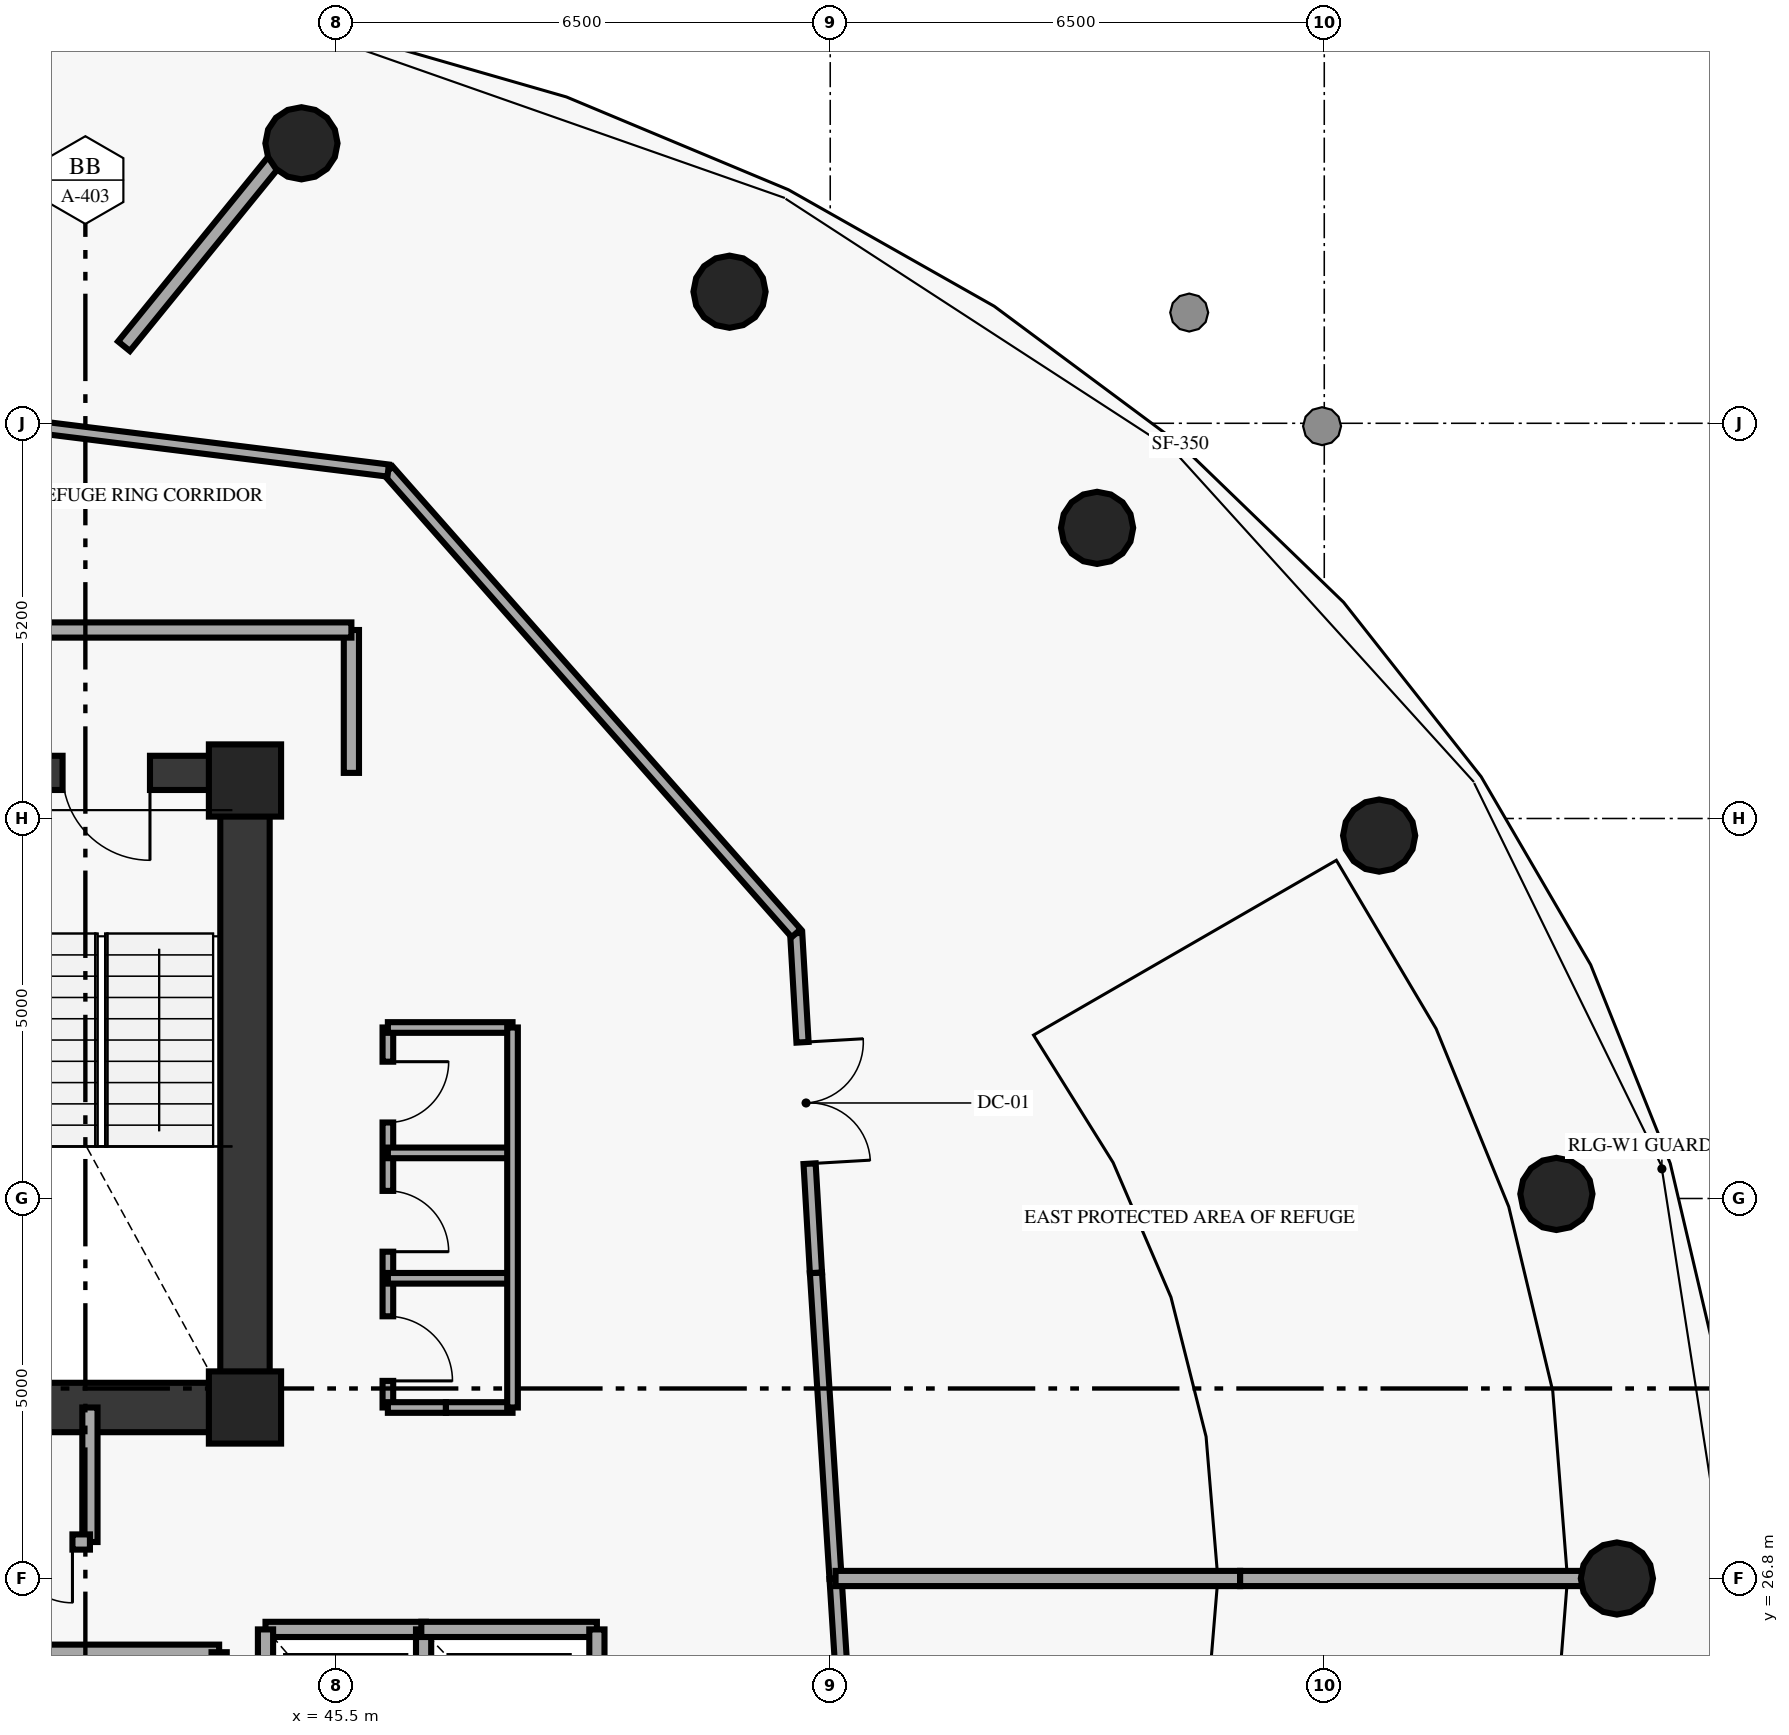
"""IFC4 building model, lengths in metres.
Left out: names, types, materials, properties, quantities, classifications, styles, units other than length and angle.
Written with IfcOpenShell. Run it as: python <this file> out.ifc"""

import sys

from ifc_helpers import new_model, si_unit, direction, frame, frame_2d, origin, origin_2d, place, context, subcontext, project, spatial, rectangle, circle, extrude, element, fill, save


model = new_model("IFC4")
c1 = context("Model", 3, precision=1e-05, world=origin(), true_north=direction((0.0, 1.0)))
c2 = subcontext(c1, "Body", "Model", "MODEL_VIEW")
j1 = project(units=[si_unit("LENGTHUNIT", "METRE"), si_unit("PLANEANGLEUNIT", "RADIAN")], contexts=[c1])
p1 = place(None, origin())
s1 = spatial("IfcSite", under=j1, at=p1, CompositionType="ELEMENT")
p2 = place(p1, origin())
s2 = spatial("IfcBuilding", under=s1, at=p2, CompositionType="ELEMENT")
p3 = place(p2, frame((0.0, 0.0, 195.95)))
s3 = spatial("IfcBuildingStorey", under=s2, at=p3, CompositionType="ELEMENT", Elevation=195.95)
for number, where, z_axis, x_axis in (
    (1, (44.3, 29.05, 0.0), (0.0, 0.0, 1.0), (1.0, 0.0, 0.0)),
    (2, (44.3, 37.3, 0.0), (0.0, 0.0, 1.0), (1.0, 0.0, 0.0)),
):
    element("IfcColumn", number, at=place(p3, frame(where, z_axis=z_axis, x_axis=x_axis)), inside=s3, PredefinedType="PILASTER", context=c2, shape_type="SweptSolid", body=[
        extrude(rectangle(XDim=0.95, YDim=0.95, at=origin_2d()), origin(), (0.0, 0.0, 1.0), 6.88),
    ])
for number, where, z_axis, x_axis in (
    (3, (62.35, 26.8, 0.0), (0.0, 0.0, 1.0), (1.0, 0.0, 0.0)),
    (4, (61.554, 31.86, 0.0), (0.0, 0.0, 1.0), (1.0, 0.0, 0.0)),
    (5, (59.222, 36.575, 0.0), (0.0, 0.0, 1.0), (1.0, 0.0, 0.0)),
    (6, (55.511, 40.624, 0.0), (0.0, 0.0, 1.0), (1.0, 0.0, 0.0)),
    (7, (50.675, 43.731, 0.0), (0.0, 0.0, 1.0), (1.0, 0.0, 0.0)),
    (8, (45.043, 45.684, 0.0), (0.0, 0.0, 1.0), (1.0, 0.0, 0.0)),
):
    element("IfcColumn", number, at=place(p3, frame(where, z_axis=z_axis, x_axis=x_axis)), inside=s3, PredefinedType="COLUMN", context=c2, shape_type="SweptSolid", body=[
        extrude(circle(Radius=0.475, at=origin_2d()), origin(), (0.0, 0.0, 1.0), 6.88),
    ])
p4 = place(p3, frame((44.3, 29.05, 0.0), z_axis=(0.0, 0.0, 1.0), x_axis=(0.0, 1.0, 0.0)))
e9 = element("IfcWall", 9, at=p4, inside=s3, PredefinedType="SHEAR", context=c2, shape_type="SweptSolid", body=[
    extrude(rectangle(XDim=8.35, YDim=0.65, at=frame_2d((4.175, 0.0))), origin(), (0.0, 0.0, 1.0), 6.88),
])
p5 = place(p3, frame((33.7, 29.05, 0.0), z_axis=(0.0, 0.0, 1.0), x_axis=(1.0, 0.0, 0.0)))
e10 = element("IfcWall", 10, at=p5, inside=s3, PredefinedType="SHEAR", context=c2, shape_type="SweptSolid", body=[
    extrude(rectangle(XDim=10.6, YDim=0.65, at=frame_2d((5.3, 0.0))), origin(), (0.0, 0.0, 1.0), 6.88),
])
p6 = place(p3, frame((44.3, 37.4, 0.0), z_axis=(0.0, 0.0, 1.0), x_axis=(-1.0, 0.0, 0.0)))
e11 = element("IfcWall", 11, at=p6, inside=s3, PredefinedType="SHEAR", context=c2, shape_type="SweptSolid", body=[
    extrude(rectangle(XDim=3.65, YDim=0.45, at=frame_2d((1.825, 0.0))), origin(), (0.0, 0.0, 1.0), 6.88),
])
p7 = place(p6, frame((1.25, 0.0, 0.0)))
e12 = element("IfcOpeningElement", 12, at=p7, cuts=e11, PredefinedType="OPENING", context=c2, shape_type="SweptSolid", body=[
    extrude(rectangle(XDim=1.15, YDim=2.15, at=frame_2d((0.575, 1.075))), frame((0.0, 0.235, 0.0), z_axis=(0.0, -1.0, 0.0), x_axis=(1.0, 0.0, 0.0)), (0.0, 0.0, 1.0), 0.47),
])
p8 = place(p3, frame((45.7, 37.4, 0.0), z_axis=(0.0, 0.0, 1.0), x_axis=(0.0, 1.0, 0.0)))
e13 = element("IfcWall", 13, at=p8, inside=s3, PredefinedType="SOLIDWALL", context=c2, shape_type="SweptSolid", body=[
    extrude(rectangle(XDim=1.88, YDim=0.2, at=frame_2d((0.94, 0.0))), origin(), (0.0, 0.0, 1.0), 6.88),
])
p9 = place(p3, frame((45.7, 39.28, 0.0), z_axis=(0.0, 0.0, 1.0), x_axis=(-1.0, 0.0, 0.0)))
e14 = element("IfcWall", 14, at=p9, inside=s3, PredefinedType="SOLIDWALL", context=c2, shape_type="SweptSolid", body=[
    extrude(rectangle(XDim=6.6, YDim=0.2, at=frame_2d((3.3, 0.0))), origin(), (0.0, 0.0, 1.0), 6.88),
])
p10 = place(p9, frame((4.35, 0.0, 0.0)))
e15 = element("IfcOpeningElement", 15, at=p10, cuts=e14, PredefinedType="OPENING", context=c2, shape_type="SweptSolid", body=[
    extrude(rectangle(XDim=1.6, YDim=2.2, at=frame_2d((0.8, 1.1))), frame((0.0, 0.11, 0.0), z_axis=(0.0, -1.0, 0.0), x_axis=(1.0, 0.0, 0.0)), (0.0, 0.0, 1.0), 0.22),
])
p11 = place(p3, frame((42.26, 27.28, 0.0), z_axis=(0.0, 0.0, 1.0), x_axis=(0.0, 1.0, 0.0)))
e16 = element("IfcWall", 16, at=p11, inside=s3, PredefinedType="SOLIDWALL", context=c2, shape_type="SweptSolid", body=[
    extrude(rectangle(XDim=1.77, YDim=0.2, at=frame_2d((0.885, 0.0))), origin(), (0.0, 0.0, 1.0), 6.88),
])
p12 = place(p3, frame((41.0, 27.28, 0.0), z_axis=(0.0, 0.0, 1.0), x_axis=(1.0, 0.0, 0.0)))
e17 = element("IfcWall", 17, at=p12, inside=s3, PredefinedType="SOLIDWALL", context=c2, shape_type="SweptSolid", body=[
    extrude(rectangle(XDim=1.26, YDim=0.2, at=frame_2d((0.63, 0.0))), origin(), (0.0, 0.0, 1.0), 6.88),
])
p13 = place(p12, frame((0.23, 0.0, 0.0)))
e18 = element("IfcOpeningElement", 18, at=p13, cuts=e17, PredefinedType="OPENING", context=c2, shape_type="SweptSolid", body=[
    extrude(rectangle(XDim=0.8, YDim=2.05, at=frame_2d((0.4, 1.025))), frame((0.0, 0.11, 0.0), z_axis=(0.0, -1.0, 0.0), x_axis=(1.0, 0.0, 0.0)), (0.0, 0.0, 1.0), 0.22),
])
p14 = place(p3, frame((44.57, 26.13, 0.0), z_axis=(0.0, 0.0, 1.0), x_axis=(1.0, 0.0, 0.0)))
e19 = element("IfcWall", 19, at=p14, inside=s3, PredefinedType="SOLIDWALL", context=c2, shape_type="SweptSolid", body=[
    extrude(rectangle(XDim=2.11, YDim=0.2, at=frame_2d((1.055, 0.0))), origin(), (0.0, 0.0, 1.0), 6.88),
])
for number, where, z_axis, x_axis in (
    (20, (44.57, 23.72, 0.0), (0.0, 0.0, 1.0), (0.0, 1.0, 0.0)),
    (21, (46.65, 23.72, 0.0), (0.0, 0.0, 1.0), (0.0, 1.0, 0.0)),
):
    element("IfcWall", number, at=place(p3, frame(where, z_axis=z_axis, x_axis=x_axis)), inside=s3, PredefinedType="SOLIDWALL", context=c2, shape_type="SweptSolid", body=[
        extrude(rectangle(XDim=2.41, YDim=0.2, at=frame_2d((1.205, 0.0))), origin(), (0.0, 0.0, 1.0), 6.88),
    ])
p15 = place(p3, frame((46.62, 26.13, 0.0), z_axis=(0.0, 0.0, 1.0), x_axis=(1.0, 0.0, 0.0)))
e22 = element("IfcWall", 22, at=p15, inside=s3, PredefinedType="SOLIDWALL", context=c2, shape_type="SweptSolid", body=[
    extrude(rectangle(XDim=2.31, YDim=0.2, at=frame_2d((1.155, 0.0))), origin(), (0.0, 0.0, 1.0), 6.88),
])
p16 = place(p3, frame((48.93, 23.72, 0.0), z_axis=(0.0, 0.0, 1.0), x_axis=(0.0, 1.0, 0.0)))
e23 = element("IfcWall", 23, at=p16, inside=s3, PredefinedType="SOLIDWALL", context=c2, shape_type="SweptSolid", body=[
    extrude(rectangle(XDim=2.41, YDim=0.2, at=frame_2d((1.205, 0.0))), origin(), (0.0, 0.0, 1.0), 6.88),
])
p17 = place(p3, frame((41.46, 25.83, 0.0), z_axis=(0.0, 0.0, 1.0), x_axis=(1.0, 0.0, 0.0)))
e24 = element("IfcWall", 24, at=p17, inside=s3, PredefinedType="SOLIDWALL", context=c2, shape_type="SweptSolid", body=[
    extrude(rectangle(XDim=2.5, YDim=0.2, at=frame_2d((1.25, 0.0))), origin(), (0.0, 0.0, 1.0), 6.88),
])
p18 = place(p3, frame((43.96, 23.42, 0.0), z_axis=(0.0, 0.0, 1.0), x_axis=(0.0, 1.0, 0.0)))
e25 = element("IfcWall", 25, at=p18, inside=s3, PredefinedType="SOLIDWALL", context=c2, shape_type="SweptSolid", body=[
    extrude(rectangle(XDim=2.41, YDim=0.2, at=frame_2d((1.205, 0.0))), origin(), (0.0, 0.0, 1.0), 6.88),
])
p19 = place(p3, frame((46.18, 34.05, 0.0), z_axis=(0.0, 0.0, 1.0), x_axis=(0.0, -1.0, 0.0)))
e26 = element("IfcWall", 26, at=p19, inside=s3, PredefinedType="PARTITIONING", context=c2, shape_type="SweptSolid", body=[
    extrude(rectangle(XDim=5.0, YDim=0.14, at=frame_2d((2.5, 0.0))), origin(), (0.0, 0.0, 1.0), 6.88),
])
p20 = place(p19, frame((3.8, 0.0, 0.0)))
e27 = element("IfcOpeningElement", 27, at=p20, cuts=e26, PredefinedType="OPENING", context=c2, shape_type="SweptSolid", body=[
    extrude(rectangle(XDim=0.85, YDim=2.1, at=frame_2d((0.425, 1.05))), frame((0.0, 0.08, 0.0), z_axis=(0.0, -1.0, 0.0), x_axis=(1.0, 0.0, 0.0)), (0.0, 0.0, 1.0), 0.16),
])
p21 = place(p19, frame((2.15, 0.0, 0.0)))
e28 = element("IfcOpeningElement", 28, at=p21, cuts=e26, PredefinedType="OPENING", context=c2, shape_type="SweptSolid", body=[
    extrude(rectangle(XDim=0.8, YDim=2.05, at=frame_2d((0.4, 1.025))), frame((0.0, 0.08, 0.0), z_axis=(0.0, -1.0, 0.0), x_axis=(1.0, 0.0, 0.0)), (0.0, 0.0, 1.0), 0.16),
])
p22 = place(p19, frame((0.45, 0.0, 0.0)))
e29 = element("IfcOpeningElement", 29, at=p22, cuts=e26, PredefinedType="OPENING", context=c2, shape_type="SweptSolid", body=[
    extrude(rectangle(XDim=0.8, YDim=2.05, at=frame_2d((0.4, 1.025))), frame((0.0, 0.08, 0.0), z_axis=(0.0, -1.0, 0.0), x_axis=(1.0, 0.0, 0.0)), (0.0, 0.0, 1.0), 0.16),
])
p23 = place(p3, frame((46.18, 29.05, 0.0), z_axis=(0.0, 0.0, 1.0), x_axis=(1.0, 0.0, 0.0)))
e30 = element("IfcWall", 30, at=p23, inside=s3, PredefinedType="PARTITIONING", context=c2, shape_type="SweptSolid", body=[
    extrude(rectangle(XDim=0.764, YDim=0.14, at=frame_2d((0.382, 0.0))), origin(), (0.0, 0.0, 1.0), 4.88),
])
p24 = place(p3, frame((46.944, 29.05, 0.0), z_axis=(0.0, 0.0, 1.0), x_axis=(1.0, 0.0, 0.0)))
e31 = element("IfcWall", 31, at=p24, inside=s3, PredefinedType="PARTITIONING", context=c2, shape_type="SweptSolid", body=[
    extrude(rectangle(XDim=0.876, YDim=0.14, at=frame_2d((0.438, 0.0))), origin(), (0.0, 0.0, 1.0), 6.88),
])
for number, where, z_axis, x_axis in (
    (32, (46.18, 30.75, 0.0), (0.0, 0.0, 1.0), (1.0, 0.0, 0.0)),
    (33, (46.18, 32.4, 0.0), (0.0, 0.0, 1.0), (1.0, 0.0, 0.0)),
    (34, (46.18, 34.05, 0.0), (0.0, 0.0, 1.0), (1.0, 0.0, 0.0)),
):
    element("IfcWall", number, at=place(p3, frame(where, z_axis=z_axis, x_axis=x_axis)), inside=s3, PredefinedType="PARTITIONING", context=c2, shape_type="SweptSolid", body=[
        extrude(rectangle(XDim=1.64, YDim=0.14, at=frame_2d((0.82, 0.0))), origin(), (0.0, 0.0, 1.0), 6.88),
    ])
p25 = place(p3, frame((47.82, 29.05, 0.0), z_axis=(0.0, 0.0, 1.0), x_axis=(0.0, 1.0, 0.0)))
e35 = element("IfcWall", 35, at=p25, inside=s3, PredefinedType="PARTITIONING", context=c2, shape_type="SweptSolid", body=[
    extrude(rectangle(XDim=5.0, YDim=0.14, at=frame_2d((2.5, 0.0))), origin(), (0.0, 0.0, 1.0), 6.88),
])
p26 = place(p3, frame((52.07, 26.8, 0.0), z_axis=(0.0, 0.0, 1.0), x_axis=(-0.064030047677, 0.997947971086, 0.0)))
e36 = element("IfcWall", 36, at=p26, inside=s3, PredefinedType="PARTITIONING", context=c2, shape_type="SweptSolid", body=[
    extrude(rectangle(XDim=4.03, YDim=0.16, at=frame_2d((2.015, 0.0))), origin(), (0.0, 0.0, 1.0), 6.88),
])
p27 = place(p3, frame((51.552, 35.291, 0.0), z_axis=(0.0, 0.0, 1.0), x_axis=(0.058082602913, -0.998311780577, 0.0)))
e37 = element("IfcWall", 37, at=p27, inside=s3, PredefinedType="PARTITIONING", context=c2, shape_type="SweptSolid", body=[
    extrude(rectangle(XDim=4.477, YDim=0.16, at=frame_2d((2.238, 0.0))), origin(), (0.0, 0.0, 1.0), 6.88),
])
p28 = place(p27, frame((1.438, 0.0, 0.0)))
e38 = element("IfcOpeningElement", 38, at=p28, cuts=e37, PredefinedType="OPENING", context=c2, shape_type="SweptSolid", body=[
    extrude(rectangle(XDim=1.6, YDim=2.2, at=frame_2d((0.8, 1.1))), frame((0.0, 0.09, 0.0), z_axis=(0.0, -1.0, 0.0), x_axis=(1.0, 0.0, 0.0)), (0.0, 0.0, 1.0), 0.18),
])
p29 = place(p3, frame((51.552, 35.291, 0.0), z_axis=(0.0, 0.0, 1.0), x_axis=(-0.661421630005, 0.750014284772, 0.0)))
e39 = element("IfcWall", 39, at=p29, inside=s3, PredefinedType="PARTITIONING", context=c2, shape_type="SweptSolid", body=[
    extrude(rectangle(XDim=8.116, YDim=0.16, at=frame_2d((4.058, 0.0))), origin(), (0.0, 0.0, 1.0), 6.88),
])
p30 = place(p3, frame((46.184, 41.378, 0.0), z_axis=(0.0, 0.0, 1.0), x_axis=(-0.992378204756, 0.12322945559, 0.0)))
e40 = element("IfcWall", 40, at=p30, inside=s3, PredefinedType="PARTITIONING", context=c2, shape_type="SweptSolid", body=[
    extrude(rectangle(XDim=7.239, YDim=0.16, at=frame_2d((3.62, 0.0))), origin(), (0.0, 0.0, 1.0), 6.88),
])
p31 = place(p3, frame((52.337, 22.614, 0.0), z_axis=(0.0, 0.0, 1.0), x_axis=(-0.063617518313, 0.997974354061, 0.0)))
e41 = element("IfcWall", 41, at=p31, inside=s3, PredefinedType="PARTITIONING", context=c2, shape_type="SweptSolid", body=[
    extrude(rectangle(XDim=4.195, YDim=0.16, at=frame_2d((2.097, 0.0))), origin(), (0.0, 0.0, 1.0), 6.88),
])
p32 = place(p3, frame((52.07, 26.8, 0.0), z_axis=(0.0, 0.0, 1.0), x_axis=(1.0, 0.0, 0.0)))
e42 = element("IfcWall", 42, at=p32, inside=s3, PredefinedType="SOLIDWALL", context=c2, shape_type="SweptSolid", body=[
    extrude(rectangle(XDim=5.323, YDim=0.2, at=frame_2d((2.662, 0.0))), origin(), (0.0, 0.0, 1.0), 6.88),
])
p33 = place(p3, frame((57.393, 26.8, 0.0), z_axis=(0.0, 0.0, 1.0), x_axis=(1.0, 0.0, 0.0)))
e43 = element("IfcWall", 43, at=p33, inside=s3, PredefinedType="SOLIDWALL", context=c2, shape_type="SweptSolid", body=[
    extrude(rectangle(XDim=5.272, YDim=0.2, at=frame_2d((2.636, 0.0))), origin(), (0.0, 0.0, 1.0), 4.88),
])
p34 = place(p3, frame((42.708, 43.014, 0.0), z_axis=(0.0, 0.0, 1.0), x_axis=(0.630674163324, 0.776047743193, 0.0)))
e44 = element("IfcWall", 44, at=p34, inside=s3, PredefinedType="SOLIDWALL", context=c2, shape_type="SweptSolid", body=[
    extrude(rectangle(XDim=3.832, YDim=0.2, at=frame_2d((1.916, 0.0))), origin(), (0.0, 0.0, 1.0), 6.88),
])
p35 = place(p7, origin())
e45 = element("IfcDoor", 45, at=p35, inside=s3, OperationType="SINGLE_SWING_LEFT", PredefinedType="DOOR", context=c2, shape_type="SweptSolid", body=[
    extrude(rectangle(XDim=1.15, YDim=2.15, at=frame_2d((0.575, 1.075))), frame((0.0, 0.025, 0.0), z_axis=(0.0, -1.0, 0.0), x_axis=(1.0, 0.0, 0.0)), (0.0, 0.0, 1.0), 0.05),
])
fill(e12, e45)
p36 = place(p13, origin())
e46 = element("IfcDoor", 46, at=p36, inside=s3, OperationType="SINGLE_SWING_RIGHT", PredefinedType="DOOR", context=c2, shape_type="SweptSolid", body=[
    extrude(rectangle(XDim=0.8, YDim=2.05, at=frame_2d((0.4, 1.025))), frame((0.0, 0.025, 0.0), z_axis=(0.0, -1.0, 0.0), x_axis=(1.0, 0.0, 0.0)), (0.0, 0.0, 1.0), 0.05),
])
fill(e18, e46)
p37 = place(p20, origin())
e47 = element("IfcDoor", 47, at=p37, inside=s3, OperationType="SINGLE_SWING_RIGHT", PredefinedType="DOOR", context=c2, shape_type="SweptSolid", body=[
    extrude(rectangle(XDim=0.85, YDim=2.1, at=frame_2d((0.425, 1.05))), frame((0.0, 0.025, 0.0), z_axis=(0.0, -1.0, 0.0), x_axis=(1.0, 0.0, 0.0)), (0.0, 0.0, 1.0), 0.05),
])
fill(e27, e47)
p38 = place(p21, origin())
e48 = element("IfcDoor", 48, at=p38, inside=s3, OperationType="SINGLE_SWING_RIGHT", PredefinedType="DOOR", context=c2, shape_type="SweptSolid", body=[
    extrude(rectangle(XDim=0.8, YDim=2.05, at=frame_2d((0.4, 1.025))), frame((0.0, 0.025, 0.0), z_axis=(0.0, -1.0, 0.0), x_axis=(1.0, 0.0, 0.0)), (0.0, 0.0, 1.0), 0.05),
])
fill(e28, e48)
p39 = place(p22, origin())
e49 = element("IfcDoor", 49, at=p39, inside=s3, OperationType="SINGLE_SWING_LEFT", PredefinedType="DOOR", context=c2, shape_type="SweptSolid", body=[
    extrude(rectangle(XDim=0.8, YDim=2.05, at=frame_2d((0.4, 1.025))), frame((0.0, 0.025, 0.0), z_axis=(0.0, -1.0, 0.0), x_axis=(1.0, 0.0, 0.0)), (0.0, 0.0, 1.0), 0.05),
])
fill(e29, e49)
p40 = place(p28, origin())
e50 = element("IfcDoor", 50, at=p40, inside=s3, OperationType="DOUBLE_DOOR_SINGLE_SWING", PredefinedType="DOOR", context=c2, shape_type="SweptSolid", body=[
    extrude(rectangle(XDim=1.6, YDim=2.2, at=frame_2d((0.8, 1.1))), frame((0.0, 0.025, 0.0), z_axis=(0.0, -1.0, 0.0), x_axis=(1.0, 0.0, 0.0)), (0.0, 0.0, 1.0), 0.05),
])
fill(e38, e50)
save(model, sys.argv[1])
